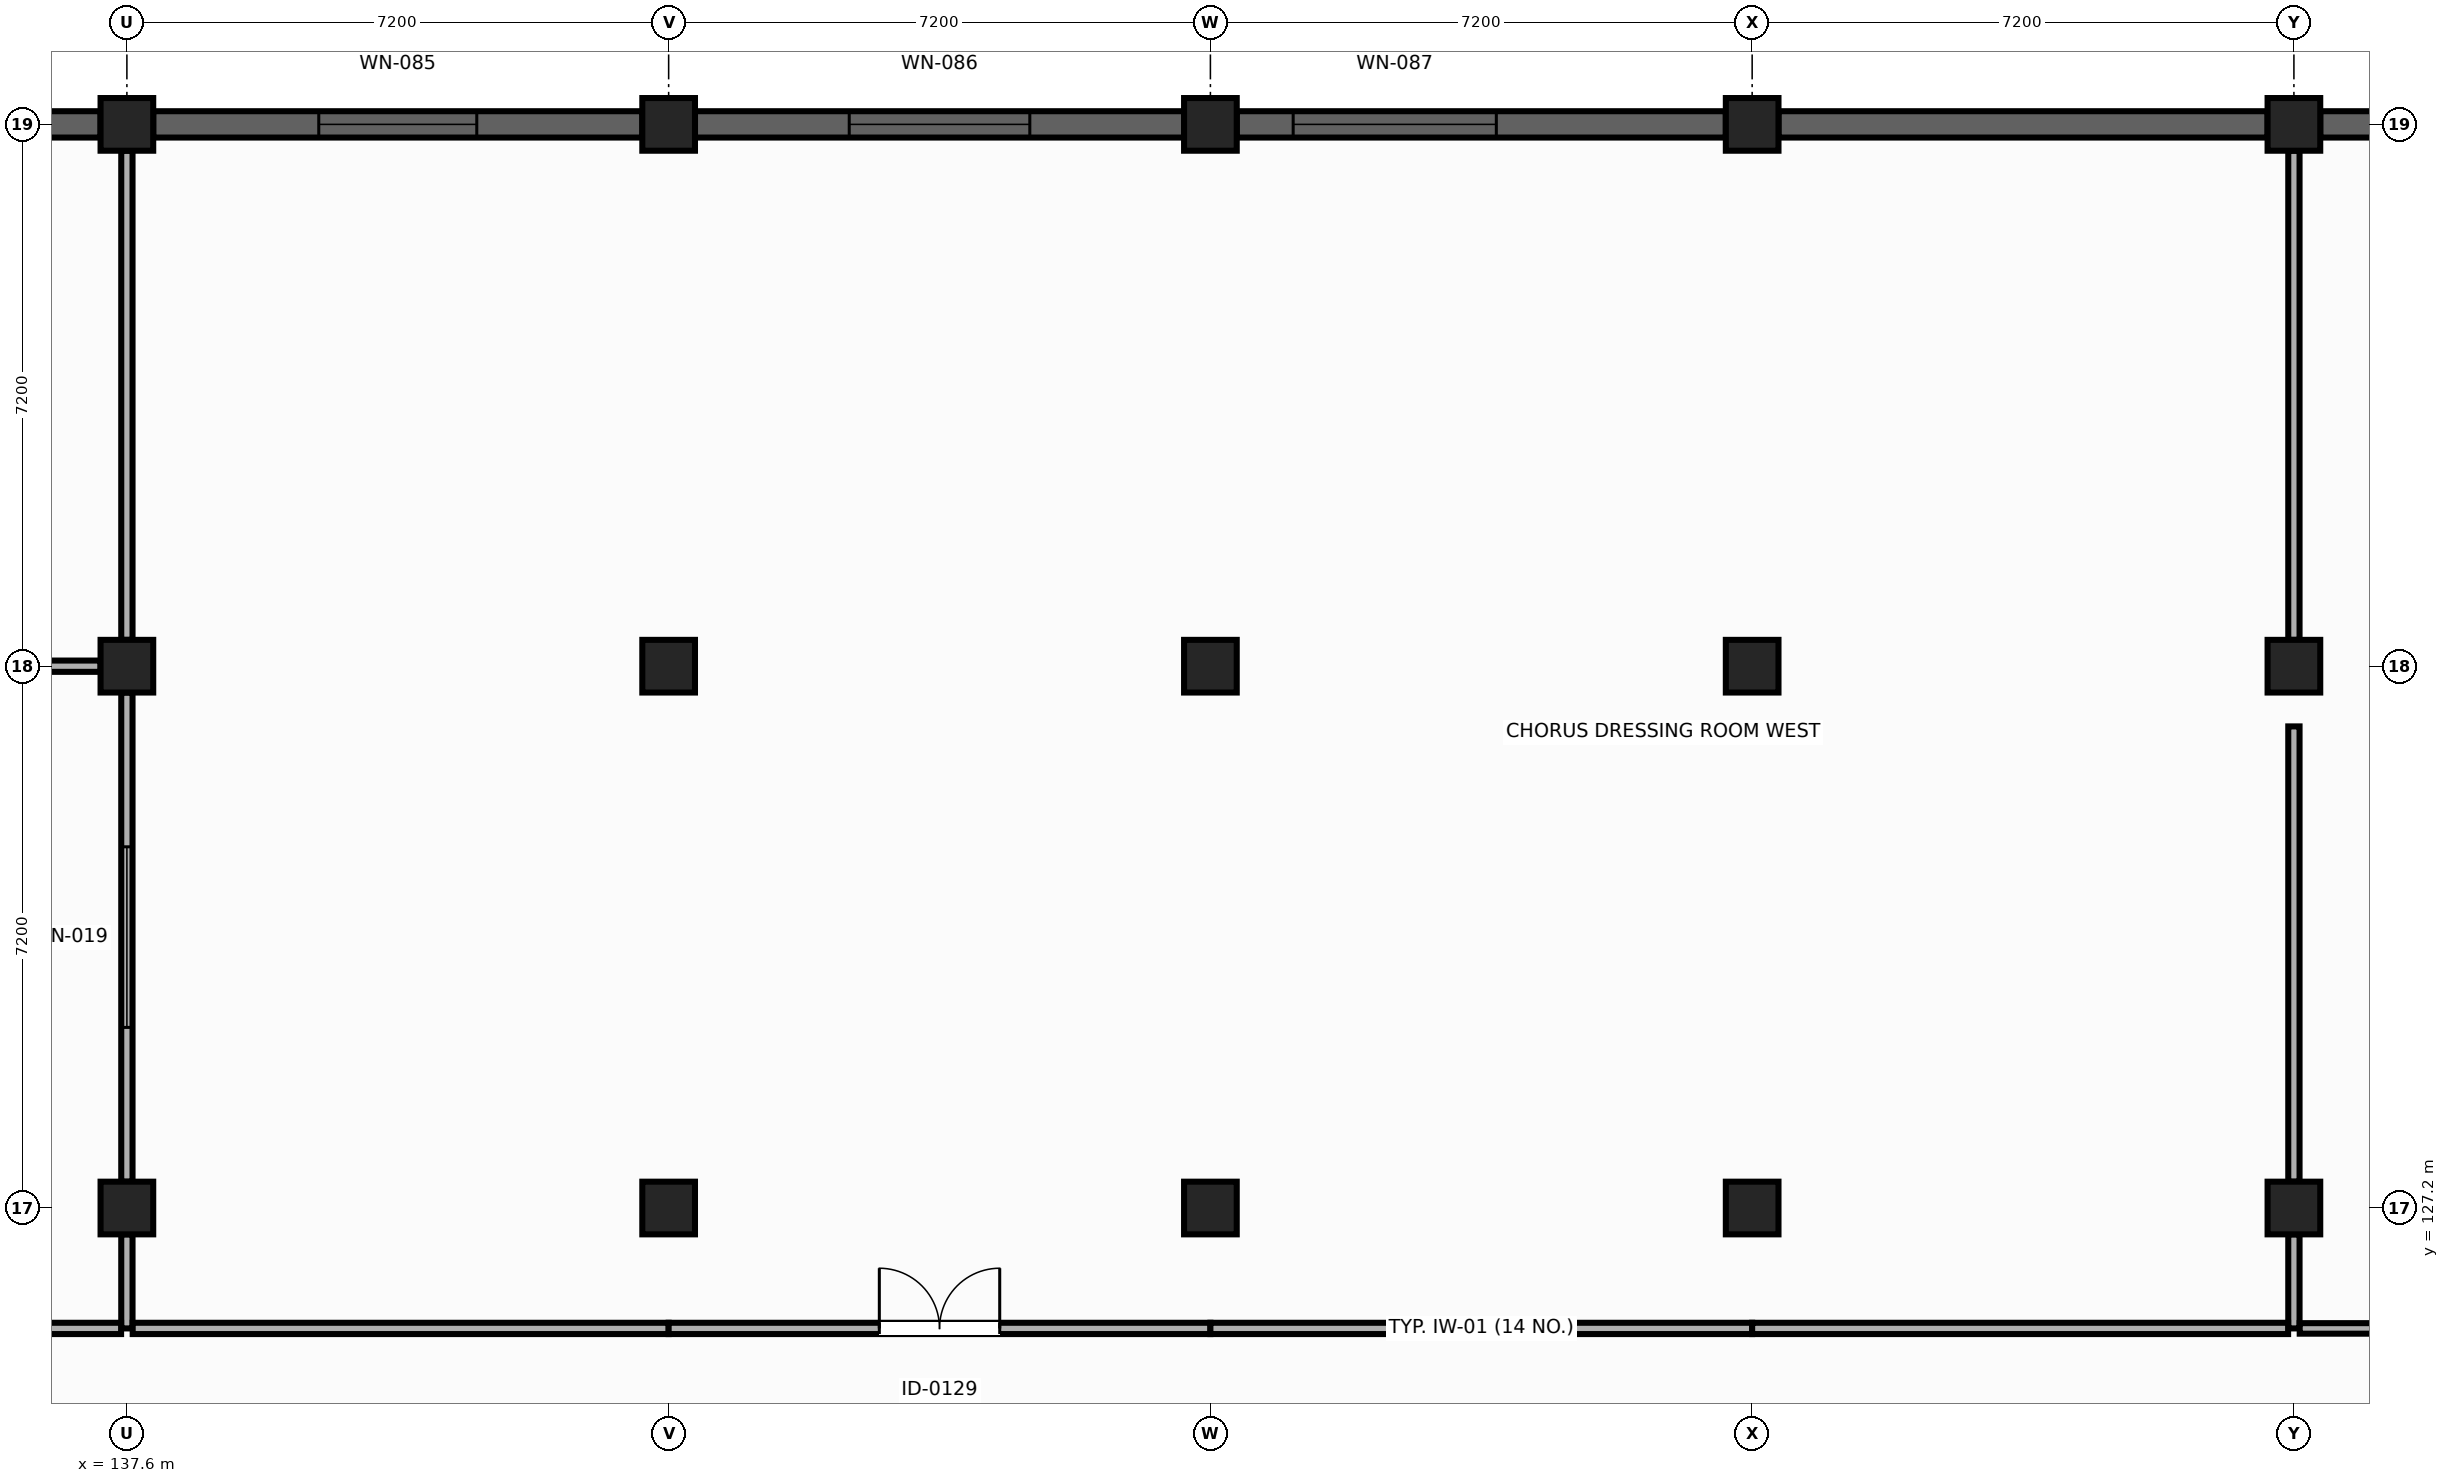
"""IFC4 building model, lengths in metres.
Left out: names, types, materials, properties, quantities, classifications, styles, units other than length and angle.
Written with IfcOpenShell. Run it as: python <this file> out.ifc"""

import sys

from ifc_helpers import new_model, si_unit, direction, frame, frame_2d, origin, origin_2d, place, context, subcontext, project, spatial, rectangle, extrude, element, fill, save


model = new_model("IFC4")
c1 = context("Model", 3, precision=1e-05, world=origin(), true_north=direction((0.0, 1.0)))
c2 = subcontext(c1, "Body", "Model", "MODEL_VIEW")
j1 = project(units=[si_unit("LENGTHUNIT", "METRE"), si_unit("PLANEANGLEUNIT", "RADIAN")], contexts=[c1])
p1 = place(None, origin())
s1 = spatial("IfcSite", under=j1, at=p1, CompositionType="ELEMENT")
p2 = place(p1, origin())
s2 = spatial("IfcBuilding", under=s1, at=p2, CompositionType="ELEMENT")
p3 = place(p2, frame((0.0, 0.0, 5.4)))
s3 = spatial("IfcBuildingStorey", under=s2, at=p3, CompositionType="ELEMENT", Elevation=5.4)
for number, where, z_axis, x_axis in (
    (1, (137.6, 127.2, 0.0), (0.0, 0.0, 1.0), (1.0, 0.0, 0.0)),
    (2, (144.8, 127.2, 0.0), (0.0, 0.0, 1.0), (1.0, 0.0, 0.0)),
    (3, (152.0, 127.2, 0.0), (0.0, 0.0, 1.0), (0.0, 1.0, 0.0)),
    (4, (159.2, 127.2, 0.0), (0.0, 0.0, 1.0), (1.0, 0.0, 0.0)),
    (5, (166.4, 127.2, 0.0), (0.0, 0.0, 1.0), (0.0, 1.0, 0.0)),
    (6, (137.6, 134.4, 0.0), (0.0, 0.0, 1.0), (1.0, 0.0, 0.0)),
    (7, (144.8, 134.4, 0.0), (0.0, 0.0, 1.0), (0.0, 1.0, 0.0)),
    (8, (152.0, 134.4, 0.0), (0.0, 0.0, 1.0), (1.0, 0.0, 0.0)),
    (9, (159.2, 134.4, 0.0), (0.0, 0.0, 1.0), (0.0, 1.0, 0.0)),
    (10, (166.4, 134.4, 0.0), (0.0, 0.0, 1.0), (1.0, 0.0, 0.0)),
    (11, (137.6, 141.6, 0.0), (0.0, 0.0, 1.0), (0.0, 1.0, 0.0)),
    (12, (144.8, 141.6, 0.0), (0.0, 0.0, 1.0), (1.0, 0.0, 0.0)),
    (13, (152.0, 141.6, 0.0), (0.0, 0.0, 1.0), (0.0, 1.0, 0.0)),
    (14, (159.2, 141.6, 0.0), (0.0, 0.0, 1.0), (1.0, 0.0, 0.0)),
    (15, (166.4, 141.6, 0.0), (0.0, 0.0, 1.0), (1.0, 0.0, 0.0)),
):
    element("IfcColumn", number, at=place(p3, frame(where, z_axis=z_axis, x_axis=x_axis)), inside=s3, PredefinedType="COLUMN", context=c2, shape_type="SweptSolid", body=[
        extrude(rectangle(XDim=0.7, YDim=0.7, at=origin_2d()), origin(), (0.0, 0.0, 1.0), 4.5),
    ])
p4 = place(p3, frame((130.75, 141.6, 0.0), z_axis=(0.0, 0.0, 1.0), x_axis=(1.0, 0.0, 0.0)))
e16 = element("IfcWall", 16, at=p4, inside=s3, PredefinedType="SOLIDWALL", context=c2, shape_type="SweptSolid", body=[
    extrude(rectangle(XDim=6.5, YDim=0.35, at=frame_2d((3.25, 0.0))), origin(), (0.0, 0.0, 1.0), 4.22),
])
p5 = place(p4, frame((2.35, 0.0, 0.9)))
e17 = element("IfcOpeningElement", 17, at=p5, cuts=e16, PredefinedType="OPENING", context=c2, shape_type="SweptSolid", body=[
    extrude(rectangle(XDim=1.8, YDim=2.1, at=frame_2d((0.9, 1.05))), frame((0.0, 0.185, 0.0), z_axis=(0.0, -1.0, 0.0), x_axis=(1.0, 0.0, 0.0)), (0.0, 0.0, 1.0), 0.37),
])
p6 = place(p3, frame((137.95, 141.6, 0.0), z_axis=(0.0, 0.0, 1.0), x_axis=(1.0, 0.0, 0.0)))
e18 = element("IfcWall", 18, at=p6, inside=s3, PredefinedType="SOLIDWALL", context=c2, shape_type="SweptSolid", body=[
    extrude(rectangle(XDim=6.5, YDim=0.35, at=frame_2d((3.25, 0.0))), origin(), (0.0, 0.0, 1.0), 4.22),
])
p7 = place(p6, frame((2.2, 0.0, 0.9)))
e19 = element("IfcOpeningElement", 19, at=p7, cuts=e18, PredefinedType="OPENING", context=c2, shape_type="SweptSolid", body=[
    extrude(rectangle(XDim=2.1, YDim=2.1, at=frame_2d((1.05, 1.05))), frame((0.0, 0.185, 0.0), z_axis=(0.0, -1.0, 0.0), x_axis=(1.0, 0.0, 0.0)), (0.0, 0.0, 1.0), 0.37),
])
p8 = place(p3, frame((145.15, 141.6, 0.0), z_axis=(0.0, 0.0, 1.0), x_axis=(1.0, 0.0, 0.0)))
e20 = element("IfcWall", 20, at=p8, inside=s3, PredefinedType="SOLIDWALL", context=c2, shape_type="SweptSolid", body=[
    extrude(rectangle(XDim=6.5, YDim=0.35, at=frame_2d((3.25, 0.0))), origin(), (0.0, 0.0, 1.0), 4.22),
])
p9 = place(p8, frame((2.05, 0.0, 0.9)))
e21 = element("IfcOpeningElement", 21, at=p9, cuts=e20, PredefinedType="OPENING", context=c2, shape_type="SweptSolid", body=[
    extrude(rectangle(XDim=2.4, YDim=2.1, at=frame_2d((1.2, 1.05))), frame((0.0, 0.185, 0.0), z_axis=(0.0, -1.0, 0.0), x_axis=(1.0, 0.0, 0.0)), (0.0, 0.0, 1.0), 0.37),
])
p10 = place(p3, frame((152.35, 141.6, 0.0), z_axis=(0.0, 0.0, 1.0), x_axis=(1.0, 0.0, 0.0)))
e22 = element("IfcWall", 22, at=p10, inside=s3, PredefinedType="SOLIDWALL", context=c2, shape_type="SweptSolid", body=[
    extrude(rectangle(XDim=6.5, YDim=0.35, at=frame_2d((3.25, 0.0))), origin(), (0.0, 0.0, 1.0), 4.22),
])
p11 = place(p10, frame((0.75, 0.0, 0.9)))
e23 = element("IfcOpeningElement", 23, at=p11, cuts=e22, PredefinedType="OPENING", context=c2, shape_type="SweptSolid", body=[
    extrude(rectangle(XDim=2.7, YDim=2.1, at=frame_2d((1.35, 1.05))), frame((0.0, 0.185, 0.0), z_axis=(0.0, -1.0, 0.0), x_axis=(1.0, 0.0, 0.0)), (0.0, 0.0, 1.0), 0.37),
])
p12 = place(p3, frame((159.55, 141.6, 0.0), z_axis=(0.0, 0.0, 1.0), x_axis=(1.0, 0.0, 0.0)))
e24 = element("IfcWall", 24, at=p12, inside=s3, PredefinedType="SOLIDWALL", context=c2, shape_type="SweptSolid", body=[
    extrude(rectangle(XDim=6.5, YDim=0.35, at=frame_2d((3.25, 0.0))), origin(), (0.0, 0.0, 1.0), 4.22),
])
p13 = place(p3, frame((166.75, 141.6, 0.0), z_axis=(0.0, 0.0, 1.0), x_axis=(1.0, 0.0, 0.0)))
e25 = element("IfcWall", 25, at=p13, inside=s3, PredefinedType="SOLIDWALL", context=c2, shape_type="SweptSolid", body=[
    extrude(rectangle(XDim=6.5, YDim=0.35, at=frame_2d((3.25, 0.0))), origin(), (0.0, 0.0, 1.0), 4.22),
])
p14 = place(p13, frame((1.75, 0.0, 0.9)))
e26 = element("IfcOpeningElement", 26, at=p14, cuts=e25, PredefinedType="OPENING", context=c2, shape_type="SweptSolid", body=[
    extrude(rectangle(XDim=3.0, YDim=2.1, at=frame_2d((1.5, 1.05))), frame((0.0, 0.185, 0.0), z_axis=(0.0, -1.0, 0.0), x_axis=(1.0, 0.0, 0.0)), (0.0, 0.0, 1.0), 0.37),
])
p15 = place(p3, frame((137.6, 127.55, 0.0), z_axis=(0.0, 0.0, 1.0), x_axis=(0.0, 1.0, 0.0)))
e27 = element("IfcWall", 27, at=p15, inside=s3, PredefinedType="PARTITIONING", context=c2, shape_type="SweptSolid", body=[
    extrude(rectangle(XDim=6.5, YDim=0.15, at=frame_2d((3.25, 0.0))), origin(), (0.0, 0.0, 1.0), 3.515),
])
p16 = place(p15, frame((2.05, 0.0, 1.1)))
e28 = element("IfcOpeningElement", 28, at=p16, cuts=e27, PredefinedType="OPENING", context=c2, shape_type="SweptSolid", body=[
    extrude(rectangle(XDim=2.4, YDim=1.1, at=frame_2d((1.2, 0.55))), frame((0.0, 0.085, 0.0), z_axis=(0.0, -1.0, 0.0), x_axis=(1.0, 0.0, 0.0)), (0.0, 0.0, 1.0), 0.17),
])
p17 = place(p3, frame((137.6, 125.6, 0.0), z_axis=(0.0, 0.0, 1.0), x_axis=(0.0, 1.0, 0.0)))
e29 = element("IfcWall", 29, at=p17, inside=s3, PredefinedType="PARTITIONING", context=c2, shape_type="SweptSolid", body=[
    extrude(rectangle(XDim=1.25, YDim=0.15, at=frame_2d((0.625, 0.0))), origin(), (0.0, 0.0, 1.0), 3.515),
])
p18 = place(p3, frame((137.25, 134.4, 0.0), z_axis=(0.0, 0.0, 1.0), x_axis=(-1.0, 0.0, 0.0)))
e30 = element("IfcWall", 30, at=p18, inside=s3, PredefinedType="PARTITIONING", context=c2, shape_type="SweptSolid", body=[
    extrude(rectangle(XDim=6.5, YDim=0.15, at=frame_2d((3.25, 0.0))), origin(), (0.0, 0.0, 1.0), 3.415),
])
p19 = place(p18, frame((2.25, 0.0, 1.1)))
e31 = element("IfcOpeningElement", 31, at=p19, cuts=e30, PredefinedType="OPENING", context=c2, shape_type="SweptSolid", body=[
    extrude(rectangle(XDim=2.0, YDim=1.1, at=frame_2d((1.0, 0.55))), frame((0.0, 0.085, 0.0), z_axis=(0.0, -1.0, 0.0), x_axis=(1.0, 0.0, 0.0)), (0.0, 0.0, 1.0), 0.17),
])
p20 = place(p3, frame((130.4, 125.6, 0.0), z_axis=(0.0, 0.0, 1.0), x_axis=(1.0, 0.0, 0.0)))
e32 = element("IfcWall", 32, at=p20, inside=s3, PredefinedType="PARTITIONING", context=c2, shape_type="SweptSolid", body=[
    extrude(rectangle(XDim=7.123, YDim=0.15, at=frame_2d((3.562, 0.0))), origin(), (0.0, 0.0, 1.0), 3.515),
])
p21 = place(p3, frame((166.4, 127.55, 0.0), z_axis=(0.0, 0.0, 1.0), x_axis=(0.0, 1.0, 0.0)))
e33 = element("IfcWall", 33, at=p21, inside=s3, PredefinedType="PARTITIONING", context=c2, shape_type="SweptSolid", body=[
    extrude(rectangle(XDim=6.05, YDim=0.15, at=frame_2d((3.025, 0.0))), origin(), (0.0, 0.0, 1.0), 3.515),
])
p22 = place(p3, frame((166.4, 125.6, 0.0), z_axis=(0.0, 0.0, 1.0), x_axis=(0.0, 1.0, 0.0)))
e34 = element("IfcWall", 34, at=p22, inside=s3, PredefinedType="PARTITIONING", context=c2, shape_type="SweptSolid", body=[
    extrude(rectangle(XDim=1.25, YDim=0.15, at=frame_2d((0.625, 0.0))), origin(), (0.0, 0.0, 1.0), 3.515),
])
for number, where, z_axis, x_axis in (
    (35, (166.4, 134.75, 0.0), (0.0, 0.0, 1.0), (0.0, 1.0, 0.0)),
    (36, (137.6, 141.25, 0.0), (0.0, 0.0, 1.0), (0.0, -1.0, 0.0)),
):
    element("IfcWall", number, at=place(p3, frame(where, z_axis=z_axis, x_axis=x_axis)), inside=s3, PredefinedType="PARTITIONING", context=c2, shape_type="SweptSolid", body=[
        extrude(rectangle(XDim=6.5, YDim=0.15, at=frame_2d((3.25, 0.0))), origin(), (0.0, 0.0, 1.0), 3.515),
    ])
p23 = place(p3, frame((137.677, 125.6, 0.0), z_axis=(0.0, 0.0, 1.0), x_axis=(1.0, 0.0, 0.0)))
e37 = element("IfcWall", 37, at=p23, inside=s3, PredefinedType="PARTITIONING", context=c2, shape_type="SweptSolid", body=[
    extrude(rectangle(XDim=7.123, YDim=0.15, at=frame_2d((3.562, 0.0))), origin(), (0.0, 0.0, 1.0), 3.515),
])
p24 = place(p3, frame((144.8, 125.6, 0.0), z_axis=(0.0, 0.0, 1.0), x_axis=(1.0, 0.0, 0.0)))
e38 = element("IfcWall", 38, at=p24, inside=s3, PredefinedType="PARTITIONING", context=c2, shape_type="SweptSolid", body=[
    extrude(rectangle(XDim=7.2, YDim=0.15, at=frame_2d((3.6, 0.0))), origin(), (0.0, 0.0, 1.0), 3.515),
])
p25 = place(p24, frame((2.8, 0.0, 0.0)))
e39 = element("IfcOpeningElement", 39, at=p25, cuts=e38, PredefinedType="OPENING", context=c2, shape_type="SweptSolid", body=[
    extrude(rectangle(XDim=1.6, YDim=2.25, at=frame_2d((0.8, 1.125))), frame((0.0, 0.085, 0.0), z_axis=(0.0, -1.0, 0.0), x_axis=(1.0, 0.0, 0.0)), (0.0, 0.0, 1.0), 0.17),
])
p26 = place(p3, frame((152.0, 125.6, 0.0), z_axis=(0.0, 0.0, 1.0), x_axis=(1.0, 0.0, 0.0)))
e40 = element("IfcWall", 40, at=p26, inside=s3, PredefinedType="PARTITIONING", context=c2, shape_type="SweptSolid", body=[
    extrude(rectangle(XDim=7.2, YDim=0.15, at=frame_2d((3.6, 0.0))), origin(), (0.0, 0.0, 1.0), 3.515),
])
p27 = place(p3, frame((159.2, 125.6, 0.0), z_axis=(0.0, 0.0, 1.0), x_axis=(1.0, 0.0, 0.0)))
e41 = element("IfcWall", 41, at=p27, inside=s3, PredefinedType="PARTITIONING", context=c2, shape_type="SweptSolid", body=[
    extrude(rectangle(XDim=7.123, YDim=0.15, at=frame_2d((3.562, 0.0))), origin(), (0.0, 0.0, 1.0), 3.515),
])
p28 = place(p3, frame((166.477, 125.6, 0.0), z_axis=(0.0, 0.0, 1.0), x_axis=(1.0, 0.0, 0.0)))
e42 = element("IfcWall", 42, at=p28, inside=s3, PredefinedType="PARTITIONING", context=c2, shape_type="SweptSolid", body=[
    extrude(rectangle(XDim=7.123, YDim=0.14, at=frame_2d((3.562, 0.0))), origin(), (0.0, 0.0, 1.0), 3.515),
])
p29 = place(p7, origin())
e43 = element("IfcWindow", 43, at=p29, inside=s3, PartitioningType="SINGLE_PANEL", PredefinedType="WINDOW", context=c2, shape_type="SweptSolid", body=[
    extrude(rectangle(XDim=2.1, YDim=2.1, at=frame_2d((1.05, 1.05))), frame((0.0, 0.03, 0.0), z_axis=(0.0, -1.0, 0.0), x_axis=(1.0, 0.0, 0.0)), (0.0, 0.0, 1.0), 0.06),
])
fill(e19, e43)
p30 = place(p9, origin())
e44 = element("IfcWindow", 44, at=p30, inside=s3, PartitioningType="SINGLE_PANEL", PredefinedType="WINDOW", context=c2, shape_type="SweptSolid", body=[
    extrude(rectangle(XDim=2.4, YDim=2.1, at=frame_2d((1.2, 1.05))), frame((0.0, 0.03, 0.0), z_axis=(0.0, -1.0, 0.0), x_axis=(1.0, 0.0, 0.0)), (0.0, 0.0, 1.0), 0.06),
])
fill(e21, e44)
p31 = place(p11, origin())
e45 = element("IfcWindow", 45, at=p31, inside=s3, PartitioningType="SINGLE_PANEL", PredefinedType="WINDOW", context=c2, shape_type="SweptSolid", body=[
    extrude(rectangle(XDim=2.7, YDim=2.1, at=frame_2d((1.35, 1.05))), frame((0.0, 0.03, 0.0), z_axis=(0.0, -1.0, 0.0), x_axis=(1.0, 0.0, 0.0)), (0.0, 0.0, 1.0), 0.06),
])
fill(e23, e45)
p32 = place(p16, origin())
e46 = element("IfcWindow", 46, at=p32, inside=s3, PartitioningType="SINGLE_PANEL", PredefinedType="WINDOW", context=c2, shape_type="SweptSolid", body=[
    extrude(rectangle(XDim=2.4, YDim=1.1, at=frame_2d((1.2, 0.55))), frame((0.0, 0.03, 0.0), z_axis=(0.0, -1.0, 0.0), x_axis=(1.0, 0.0, 0.0)), (0.0, 0.0, 1.0), 0.06),
])
fill(e28, e46)
p33 = place(p25, origin())
e47 = element("IfcDoor", 47, at=p33, inside=s3, OperationType="DOUBLE_DOOR_SINGLE_SWING", PredefinedType="DOOR", context=c2, shape_type="SweptSolid", body=[
    extrude(rectangle(XDim=1.6, YDim=2.25, at=frame_2d((0.8, 1.125))), frame((0.0, 0.025, 0.0), z_axis=(0.0, -1.0, 0.0), x_axis=(1.0, 0.0, 0.0)), (0.0, 0.0, 1.0), 0.05),
])
fill(e39, e47)
save(model, sys.argv[1])
